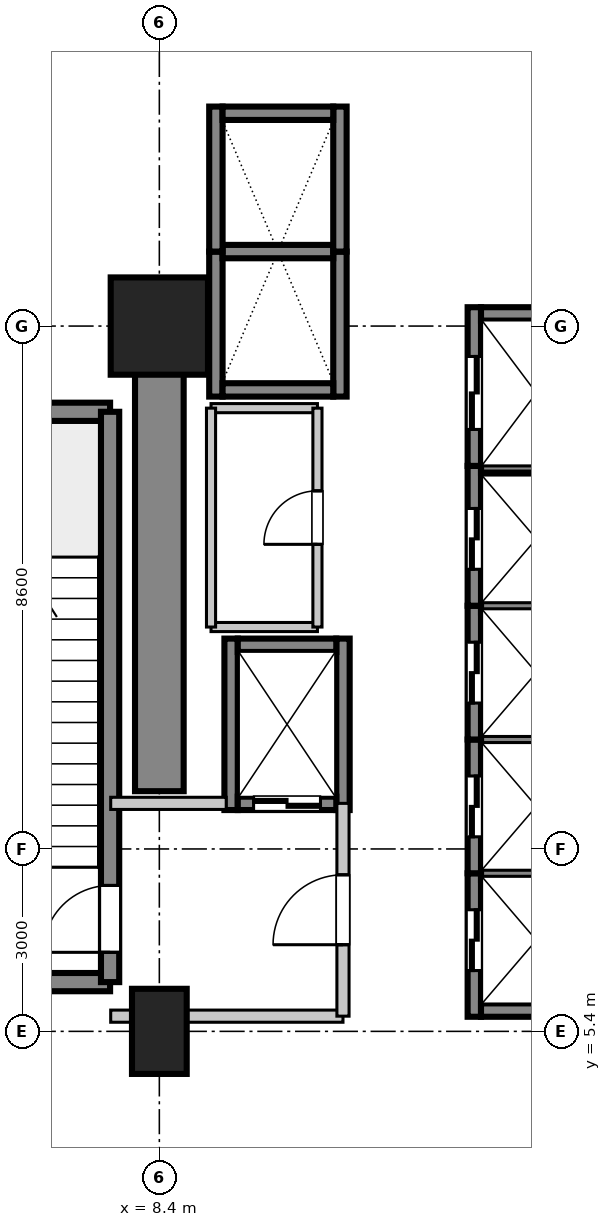
"""IFC4 building model, lengths in metres.
Left out: names, types, materials, properties, quantities, classifications, styles, units other than length and angle.
Written with IfcOpenShell. Run it as: python <this file> out.ifc"""

import sys

from ifc_helpers import new_model, si_unit, direction, frame, frame_2d, origin, origin_2d, place, context, subcontext, project, spatial, rectangle, extrude, source, transform, mapped, element, fill, save


model = new_model("IFC4")
c1 = context("Model", 3, precision=1e-05, world=origin(), true_north=direction((0.0, 1.0)))
c2 = subcontext(c1, "Body", "Model", "MODEL_VIEW")
j1 = project(units=[si_unit("LENGTHUNIT", "METRE"), si_unit("PLANEANGLEUNIT", "RADIAN")], contexts=[c1])
p1 = place(None, origin())
s1 = spatial("IfcSite", under=j1, at=p1, CompositionType="ELEMENT")
p2 = place(p1, origin())
s2 = spatial("IfcBuilding", under=s1, at=p2, CompositionType="ELEMENT")
p3 = place(p2, frame((0.0, 0.0, 21.6)))
s3 = spatial("IfcBuildingStorey", under=s2, at=p3, CompositionType="ELEMENT", Elevation=21.6)
m1 = source(origin(), c2, "Body", "SweptSolid", [
    extrude(rectangle(XDim=0.9, YDim=1.4, at=origin_2d()), origin(), (0.0, 0.0, 1.0), 5.355),
])
p4 = place(p3, frame((8.4, 5.4, 0.0), z_axis=(0.0, 0.0, 1.0), x_axis=(1.0, 0.0, 0.0)))
e1 = element("IfcColumn", 1, at=p4, inside=s3, PredefinedType="PILASTER", context=c2, shape_type="MappedRepresentation", body=[
    mapped(m1, transform((0.0, 0.0, 0.0), scale=1.0)),
])
m2 = source(origin(), c2, "Body", "SweptSolid", [
    extrude(rectangle(XDim=1.6, YDim=1.6, at=origin_2d()), origin(), (0.0, 0.0, 1.0), 5.355),
])
p5 = place(p3, frame((8.4, 17.0, 0.0), z_axis=(0.0, 0.0, 1.0), x_axis=(1.0, 0.0, 0.0)))
e2 = element("IfcColumn", 2, at=p5, inside=s3, PredefinedType="COLUMN", context=c2, shape_type="MappedRepresentation", body=[
    mapped(m2, transform((0.0, 0.0, 0.0), scale=1.0)),
])
m3 = source(origin(), c2, "Body", "SweptSolid", [
    extrude(rectangle(XDim=7.65, YDim=0.8, at=frame_2d((3.825, 0.0))), origin(), (0.0, 0.0, 1.0), 4.98),
])
p6 = place(p3, frame((8.4, 9.35, 0.0), z_axis=(0.0, 0.0, 1.0), x_axis=(0.0, 1.0, 0.0)))
e3 = element("IfcWall", 3, at=p6, inside=s3, PredefinedType="SHEAR", context=c2, shape_type="MappedRepresentation", body=[
    mapped(m3, transform((0.0, 0.0, 0.0), scale=1.0)),
])
m4 = source(origin(), c2, "Body", "SweptSolid", [
    extrude(rectangle(XDim=3.98, YDim=0.3, at=frame_2d((1.99, 0.0))), origin(), (0.0, 0.0, 1.0), 4.98),
])
for number, where, z_axis, x_axis in (
    (4, (3.61, 6.21, 0.0), (0.0, 0.0, 1.0), (1.0, 0.0, 0.0)),
    (5, (3.61, 15.59, 0.0), (0.0, 0.0, 1.0), (1.0, 0.0, 0.0)),
):
    element("IfcWall", number, at=place(p3, frame(where, z_axis=z_axis, x_axis=x_axis)), inside=s3, PredefinedType="SHEAR", context=c2, shape_type="MappedRepresentation", body=[
        mapped(m4, transform((0.0, 0.0, 0.0), scale=1.0)),
    ])
m5 = source(origin(), c2, "Body", "SweptSolid", [
    extrude(rectangle(XDim=9.38, YDim=0.3, at=frame_2d((4.69, 0.0))), origin(), (0.0, 0.0, 1.0), 4.98),
])
p7 = place(p3, frame((7.59, 6.21, 0.0), z_axis=(0.0, 0.0, 1.0), x_axis=(0.0, 1.0, 0.0)))
e6 = element("IfcWall", 6, at=p7, inside=s3, PredefinedType="SHEAR", context=c2, shape_type="MappedRepresentation", body=[
    mapped(m5, transform((0.0, 0.0, 0.0), scale=1.0)),
])
p8 = place(p7, frame((0.49, 0.0, 0.0)))
e7 = element("IfcOpeningElement", 7, at=p8, cuts=e6, PredefinedType="OPENING", context=c2, shape_type="SweptSolid", body=[
    extrude(rectangle(XDim=1.1, YDim=2.15, at=frame_2d((0.55, 1.075))), frame((0.0, 0.16, 0.0), z_axis=(0.0, -1.0, 0.0), x_axis=(1.0, 0.0, 0.0)), (0.0, 0.0, 1.0), 0.32),
])
m6 = source(origin(), c2, "Body", "SweptSolid", [
    extrude(rectangle(XDim=2.36, YDim=0.22, at=frame_2d((1.18, 0.0))), origin(), (0.0, 0.0, 1.0), 4.98),
])
p9 = place(p3, frame((13.58, 5.64, 0.0), z_axis=(0.0, 0.0, 1.0), x_axis=(0.0, 1.0, 0.0)))
e8 = element("IfcWall", 8, at=p9, inside=s3, PredefinedType="SHEAR", context=c2, shape_type="MappedRepresentation", body=[
    mapped(m6, transform((0.0, 0.0, 0.0), scale=1.0)),
])
p10 = place(p9, frame((0.76, 0.0, 0.0)))
e9 = element("IfcOpeningElement", 9, at=p10, cuts=e8, PredefinedType="OPENING", context=c2, shape_type="SweptSolid", body=[
    extrude(rectangle(XDim=1.0, YDim=2.2, at=frame_2d((0.5, 1.1))), frame((0.0, 0.12, 0.0), z_axis=(0.0, -1.0, 0.0), x_axis=(1.0, 0.0, 0.0)), (0.0, 0.0, 1.0), 0.24),
])
m7 = source(origin(), c2, "Body", "SweptSolid", [
    extrude(rectangle(XDim=1.82, YDim=0.22, at=frame_2d((0.91, 0.0))), origin(), (0.0, 0.0, 1.0), 4.98),
])
p11 = place(p3, frame((13.69, 5.75, 0.0), z_axis=(0.0, 0.0, 1.0), x_axis=(1.0, 0.0, 0.0)))
e10 = element("IfcWall", 10, at=p11, inside=s3, PredefinedType="SHEAR", context=c2, shape_type="MappedRepresentation", body=[
    mapped(m7, transform((0.0, 0.0, 0.0), scale=1.0)),
])
m8 = source(origin(), c2, "Body", "SweptSolid", [
    extrude(rectangle(XDim=1.82, YDim=0.22, at=frame_2d((0.91, 0.0))), origin(), (0.0, 0.0, 1.0), 5.4),
])
p12 = place(p3, frame((13.69, 8.0, 0.0), z_axis=(0.0, 0.0, 1.0), x_axis=(1.0, 0.0, 0.0)))
e11 = element("IfcWall", 11, at=p12, inside=s3, PredefinedType="SHEAR", context=c2, shape_type="MappedRepresentation", body=[
    mapped(m8, transform((0.0, 0.0, 0.0), scale=1.0)),
])
m9 = source(origin(), c2, "Body", "SweptSolid", [
    extrude(rectangle(XDim=2.2, YDim=0.22, at=frame_2d((1.1, 0.0))), origin(), (0.0, 0.0, 1.0), 4.98),
])
p13 = place(p3, frame((13.58, 8.0, 0.0), z_axis=(0.0, 0.0, 1.0), x_axis=(0.0, 1.0, 0.0)))
e12 = element("IfcWall", 12, at=p13, inside=s3, PredefinedType="SHEAR", context=c2, shape_type="MappedRepresentation", body=[
    mapped(m9, transform((0.0, 0.0, 0.0), scale=1.0)),
])
p14 = place(p13, frame((0.6, 0.0, 0.0)))
e13 = element("IfcOpeningElement", 13, at=p14, cuts=e12, PredefinedType="OPENING", context=c2, shape_type="SweptSolid", body=[
    extrude(rectangle(XDim=1.0, YDim=2.2, at=frame_2d((0.5, 1.1))), frame((0.0, 0.12, 0.0), z_axis=(0.0, -1.0, 0.0), x_axis=(1.0, 0.0, 0.0)), (0.0, 0.0, 1.0), 0.24),
])
p15 = place(p3, frame((13.69, 10.2, 0.0), z_axis=(0.0, 0.0, 1.0), x_axis=(1.0, 0.0, 0.0)))
e14 = element("IfcWall", 14, at=p15, inside=s3, PredefinedType="SHEAR", context=c2, shape_type="MappedRepresentation", body=[
    mapped(m8, transform((0.0, 0.0, 0.0), scale=1.0)),
])
p16 = place(p3, frame((13.58, 10.2, 0.0), z_axis=(0.0, 0.0, 1.0), x_axis=(0.0, 1.0, 0.0)))
e15 = element("IfcWall", 15, at=p16, inside=s3, PredefinedType="SHEAR", context=c2, shape_type="MappedRepresentation", body=[
    mapped(m9, transform((0.0, 0.0, 0.0), scale=1.0)),
])
p17 = place(p16, frame((0.6, 0.0, 0.0)))
e16 = element("IfcOpeningElement", 16, at=p17, cuts=e15, PredefinedType="OPENING", context=c2, shape_type="SweptSolid", body=[
    extrude(rectangle(XDim=1.0, YDim=2.2, at=frame_2d((0.5, 1.1))), frame((0.0, 0.12, 0.0), z_axis=(0.0, -1.0, 0.0), x_axis=(1.0, 0.0, 0.0)), (0.0, 0.0, 1.0), 0.24),
])
p18 = place(p3, frame((13.69, 12.4, 0.0), z_axis=(0.0, 0.0, 1.0), x_axis=(1.0, 0.0, 0.0)))
e17 = element("IfcWall", 17, at=p18, inside=s3, PredefinedType="SHEAR", context=c2, shape_type="MappedRepresentation", body=[
    mapped(m8, transform((0.0, 0.0, 0.0), scale=1.0)),
])
m10 = source(origin(), c2, "Body", "SweptSolid", [
    extrude(rectangle(XDim=2.3, YDim=0.22, at=frame_2d((1.15, 0.0))), origin(), (0.0, 0.0, 1.0), 4.98),
])
p19 = place(p3, frame((13.58, 12.4, 0.0), z_axis=(0.0, 0.0, 1.0), x_axis=(0.0, 1.0, 0.0)))
e18 = element("IfcWall", 18, at=p19, inside=s3, PredefinedType="SHEAR", context=c2, shape_type="MappedRepresentation", body=[
    mapped(m10, transform((0.0, 0.0, 0.0), scale=1.0)),
])
p20 = place(p19, frame((0.6, 0.0, 0.0)))
e19 = element("IfcOpeningElement", 19, at=p20, cuts=e18, PredefinedType="OPENING", context=c2, shape_type="SweptSolid", body=[
    extrude(rectangle(XDim=1.0, YDim=2.2, at=frame_2d((0.5, 1.1))), frame((0.0, 0.12, 0.0), z_axis=(0.0, -1.0, 0.0), x_axis=(1.0, 0.0, 0.0)), (0.0, 0.0, 1.0), 0.24),
])
p21 = place(p3, frame((13.69, 14.7, 0.0), z_axis=(0.0, 0.0, 1.0), x_axis=(1.0, 0.0, 0.0)))
e20 = element("IfcWall", 20, at=p21, inside=s3, PredefinedType="SHEAR", context=c2, shape_type="MappedRepresentation", body=[
    mapped(m8, transform((0.0, 0.0, 0.0), scale=1.0)),
])
m11 = source(origin(), c2, "Body", "SweptSolid", [
    extrude(rectangle(XDim=2.385, YDim=0.22, at=frame_2d((1.192, 0.0))), origin(), (0.0, 0.0, 1.0), 4.98),
])
for number, where, z_axis, x_axis in (
    (21, (9.33, 15.84, 0.0), (0.0, 0.0, 1.0), (0.0, 1.0, 0.0)),
    (22, (11.37, 15.84, 0.0), (0.0, 0.0, 1.0), (0.0, 1.0, 0.0)),
):
    element("IfcWall", number, at=place(p3, frame(where, z_axis=z_axis, x_axis=x_axis)), inside=s3, PredefinedType="SHEAR", context=c2, shape_type="MappedRepresentation", body=[
        mapped(m11, transform((0.0, 0.0, 0.0), scale=1.0)),
    ])
p22 = place(p3, frame((9.44, 15.95, 0.0), z_axis=(0.0, 0.0, 1.0), x_axis=(1.0, 0.0, 0.0)))
e23 = element("IfcWall", 23, at=p22, inside=s3, PredefinedType="SHEAR", context=c2, shape_type="MappedRepresentation", body=[
    mapped(m7, transform((0.0, 0.0, 0.0), scale=1.0)),
])
p23 = place(p3, frame((9.44, 18.225, 0.0), z_axis=(0.0, 0.0, 1.0), x_axis=(1.0, 0.0, 0.0)))
e24 = element("IfcWall", 24, at=p23, inside=s3, PredefinedType="SHEAR", context=c2, shape_type="MappedRepresentation", body=[
    mapped(m8, transform((0.0, 0.0, 0.0), scale=1.0)),
])
for number, where, z_axis, x_axis in (
    (25, (9.33, 18.225, 0.0), (0.0, 0.0, 1.0), (0.0, 1.0, 0.0)),
    (26, (11.37, 18.225, 0.0), (0.0, 0.0, 1.0), (0.0, 1.0, 0.0)),
):
    element("IfcWall", number, at=place(p3, frame(where, z_axis=z_axis, x_axis=x_axis)), inside=s3, PredefinedType="SHEAR", context=c2, shape_type="MappedRepresentation", body=[
        mapped(m11, transform((0.0, 0.0, 0.0), scale=1.0)),
    ])
p24 = place(p3, frame((9.44, 20.5, 0.0), z_axis=(0.0, 0.0, 1.0), x_axis=(1.0, 0.0, 0.0)))
e27 = element("IfcWall", 27, at=p24, inside=s3, PredefinedType="SHEAR", context=c2, shape_type="MappedRepresentation", body=[
    mapped(m7, transform((0.0, 0.0, 0.0), scale=1.0)),
])
m12 = source(origin(), c2, "Body", "SweptSolid", [
    extrude(rectangle(XDim=2.82, YDim=0.22, at=frame_2d((1.41, 0.0))), origin(), (0.0, 0.0, 1.0), 4.98),
])
for number, where, z_axis, x_axis in (
    (28, (9.58, 9.04, 0.0), (0.0, 0.0, 1.0), (0.0, 1.0, 0.0)),
    (29, (11.42, 9.04, 0.0), (0.0, 0.0, 1.0), (0.0, 1.0, 0.0)),
):
    element("IfcWall", number, at=place(p3, frame(where, z_axis=z_axis, x_axis=x_axis)), inside=s3, PredefinedType="SHEAR", context=c2, shape_type="MappedRepresentation", body=[
        mapped(m12, transform((0.0, 0.0, 0.0), scale=1.0)),
    ])
m13 = source(origin(), c2, "Body", "SweptSolid", [
    extrude(rectangle(XDim=1.62, YDim=0.22, at=frame_2d((0.81, 0.0))), origin(), (0.0, 0.0, 1.0), 4.98),
])
p25 = place(p3, frame((9.69, 9.15, 0.0), z_axis=(0.0, 0.0, 1.0), x_axis=(1.0, 0.0, 0.0)))
e30 = element("IfcWall", 30, at=p25, inside=s3, PredefinedType="SHEAR", context=c2, shape_type="MappedRepresentation", body=[
    mapped(m13, transform((0.0, 0.0, 0.0), scale=1.0)),
])
p26 = place(p25, frame((0.26, 0.0, 0.0)))
e31 = element("IfcOpeningElement", 31, at=p26, cuts=e30, PredefinedType="OPENING", context=c2, shape_type="SweptSolid", body=[
    extrude(rectangle(XDim=1.1, YDim=2.2, at=frame_2d((0.55, 1.1))), frame((0.0, 0.12, 0.0), z_axis=(0.0, -1.0, 0.0), x_axis=(1.0, 0.0, 0.0)), (0.0, 0.0, 1.0), 0.24),
])
p27 = place(p3, frame((9.69, 11.75, 0.0), z_axis=(0.0, 0.0, 1.0), x_axis=(1.0, 0.0, 0.0)))
e32 = element("IfcWall", 32, at=p27, inside=s3, PredefinedType="SHEAR", context=c2, shape_type="MappedRepresentation", body=[
    mapped(m13, transform((0.0, 0.0, 0.0), scale=1.0)),
])
m14 = source(origin(), c2, "Body", "SweptSolid", [
    extrude(rectangle(XDim=2.61, YDim=0.22, at=frame_2d((1.305, 0.0))), origin(), (0.0, 0.0, 1.0), 4.98),
])
p28 = place(p3, frame((13.58, 14.7, 0.0), z_axis=(0.0, 0.0, 1.0), x_axis=(0.0, 1.0, 0.0)))
e33 = element("IfcWall", 33, at=p28, inside=s3, PredefinedType="SHEAR", context=c2, shape_type="MappedRepresentation", body=[
    mapped(m14, transform((0.0, 0.0, 0.0), scale=1.0)),
])
p29 = place(p28, frame((0.6, 0.0, 0.0)))
e34 = element("IfcOpeningElement", 34, at=p29, cuts=e33, PredefinedType="OPENING", context=c2, shape_type="SweptSolid", body=[
    extrude(rectangle(XDim=1.2, YDim=2.2, at=frame_2d((0.6, 1.1))), frame((0.0, 0.12, 0.0), z_axis=(0.0, -1.0, 0.0), x_axis=(1.0, 0.0, 0.0)), (0.0, 0.0, 1.0), 0.24),
])
p30 = place(p3, frame((13.69, 17.2, 0.0), z_axis=(0.0, 0.0, 1.0), x_axis=(1.0, 0.0, 0.0)))
e35 = element("IfcWall", 35, at=p30, inside=s3, PredefinedType="SHEAR", context=c2, shape_type="MappedRepresentation", body=[
    mapped(m7, transform((0.0, 0.0, 0.0), scale=1.0)),
])
m15 = source(origin(), c2, "Body", "SweptSolid", [
    extrude(rectangle(XDim=3.82, YDim=0.2, at=frame_2d((1.91, 0.0))), origin(), (0.0, 0.0, 1.0), 3.1),
])
p31 = place(p3, frame((7.6, 5.65, 0.0), z_axis=(0.0, 0.0, 1.0), x_axis=(1.0, 0.0, 0.0)))
e36 = element("IfcWall", 36, at=p31, inside=s3, PredefinedType="PARTITIONING", context=c2, shape_type="MappedRepresentation", body=[
    mapped(m15, transform((0.0, 0.0, 0.0), scale=1.0)),
])
m16 = source(origin(), c2, "Body", "SweptSolid", [
    extrude(rectangle(XDim=1.9, YDim=0.2, at=frame_2d((0.95, 0.0))), origin(), (0.0, 0.0, 1.0), 3.1),
])
p32 = place(p3, frame((7.6, 9.15, 0.0), z_axis=(0.0, 0.0, 1.0), x_axis=(1.0, 0.0, 0.0)))
e37 = element("IfcWall", 37, at=p32, inside=s3, PredefinedType="PARTITIONING", context=c2, shape_type="MappedRepresentation", body=[
    mapped(m16, transform((0.0, 0.0, 0.0), scale=1.0)),
])
m17 = source(origin(), c2, "Body", "SweptSolid", [
    extrude(rectangle(XDim=3.5, YDim=0.2, at=frame_2d((1.75, 0.0))), origin(), (0.0, 0.0, 1.0), 3.1),
])
p33 = place(p3, frame((11.42, 5.65, 0.0), z_axis=(0.0, 0.0, 1.0), x_axis=(0.0, 1.0, 0.0)))
e38 = element("IfcWall", 38, at=p33, inside=s3, PredefinedType="PARTITIONING", context=c2, shape_type="MappedRepresentation", body=[
    mapped(m17, transform((0.0, 0.0, 0.0), scale=1.0)),
])
p34 = place(p33, frame((1.175, 0.0, 0.0)))
e39 = element("IfcOpeningElement", 39, at=p34, cuts=e38, PredefinedType="OPENING", context=c2, shape_type="SweptSolid", body=[
    extrude(rectangle(XDim=1.15, YDim=2.15, at=frame_2d((0.575, 1.075))), frame((0.0, 0.11, 0.0), z_axis=(0.0, -1.0, 0.0), x_axis=(1.0, 0.0, 0.0)), (0.0, 0.0, 1.0), 0.22),
])
m18 = source(origin(), c2, "Body", "SweptSolid", [
    extrude(rectangle(XDim=1.75, YDim=0.15, at=frame_2d((0.875, 0.0))), origin(), (0.0, 0.0, 1.0), 3.1),
])
for number, where, z_axis, x_axis in (
    (40, (9.25, 12.05, 0.0), (0.0, 0.0, 1.0), (1.0, 0.0, 0.0)),
    (41, (9.25, 15.65, 0.0), (0.0, 0.0, 1.0), (1.0, 0.0, 0.0)),
):
    element("IfcWall", number, at=place(p3, frame(where, z_axis=z_axis, x_axis=x_axis)), inside=s3, PredefinedType="PARTITIONING", context=c2, shape_type="MappedRepresentation", body=[
        mapped(m18, transform((0.0, 0.0, 0.0), scale=1.0)),
    ])
m19 = source(origin(), c2, "Body", "SweptSolid", [
    extrude(rectangle(XDim=3.6, YDim=0.15, at=frame_2d((1.8, 0.0))), origin(), (0.0, 0.0, 1.0), 3.1),
])
p35 = place(p3, frame((9.25, 12.05, 0.0), z_axis=(0.0, 0.0, 1.0), x_axis=(0.0, 1.0, 0.0)))
e42 = element("IfcWall", 42, at=p35, inside=s3, PredefinedType="PARTITIONING", context=c2, shape_type="MappedRepresentation", body=[
    mapped(m19, transform((0.0, 0.0, 0.0), scale=1.0)),
])
p36 = place(p3, frame((11.0, 12.05, 0.0), z_axis=(0.0, 0.0, 1.0), x_axis=(0.0, 1.0, 0.0)))
e43 = element("IfcWall", 43, at=p36, inside=s3, PredefinedType="PARTITIONING", context=c2, shape_type="MappedRepresentation", body=[
    mapped(m19, transform((0.0, 0.0, 0.0), scale=1.0)),
])
p37 = place(p36, frame((1.36, 0.0, 0.0)))
e44 = element("IfcOpeningElement", 44, at=p37, cuts=e43, PredefinedType="OPENING", context=c2, shape_type="SweptSolid", body=[
    extrude(rectangle(XDim=0.88, YDim=2.1, at=frame_2d((0.44, 1.05))), frame((0.0, 0.085, 0.0), z_axis=(0.0, -1.0, 0.0), x_axis=(1.0, 0.0, 0.0)), (0.0, 0.0, 1.0), 0.17),
])
m20 = source(origin(), c2, "Body", "SweptSolid", [
    extrude(rectangle(XDim=1.1, YDim=2.15, at=frame_2d((0.55, 1.075))), frame((0.0, 0.025, 0.0), z_axis=(0.0, -1.0, 0.0), x_axis=(1.0, 0.0, 0.0)), (0.0, 0.0, 1.0), 0.05),
])
p38 = place(p8, origin())
e45 = element("IfcDoor", 45, at=p38, inside=s3, OperationType="SINGLE_SWING_LEFT", PredefinedType="DOOR", context=c2, shape_type="MappedRepresentation", body=[
    mapped(m20, transform((0.0, 0.0, 0.0), scale=1.0)),
])
fill(e7, e45)
m21 = source(origin(), c2, "Body", "SweptSolid", [
    extrude(rectangle(XDim=1.0, YDim=2.2, at=frame_2d((0.5, 1.1))), frame((0.0, 0.025, 0.0), z_axis=(0.0, -1.0, 0.0), x_axis=(1.0, 0.0, 0.0)), (0.0, 0.0, 1.0), 0.05),
])
p39 = place(p10, origin())
e46 = element("IfcDoor", 46, at=p39, inside=s3, OperationType="DOUBLE_DOOR_SLIDING", PredefinedType="DOOR", context=c2, shape_type="MappedRepresentation", body=[
    mapped(m21, transform((0.0, 0.0, 0.0), scale=1.0)),
])
fill(e9, e46)
p40 = place(p14, origin())
e47 = element("IfcDoor", 47, at=p40, inside=s3, OperationType="DOUBLE_DOOR_SLIDING", PredefinedType="DOOR", context=c2, shape_type="MappedRepresentation", body=[
    mapped(m21, transform((0.0, 0.0, 0.0), scale=1.0)),
])
fill(e13, e47)
p41 = place(p17, origin())
e48 = element("IfcDoor", 48, at=p41, inside=s3, OperationType="DOUBLE_DOOR_SLIDING", PredefinedType="DOOR", context=c2, shape_type="MappedRepresentation", body=[
    mapped(m21, transform((0.0, 0.0, 0.0), scale=1.0)),
])
fill(e16, e48)
p42 = place(p20, origin())
e49 = element("IfcDoor", 49, at=p42, inside=s3, OperationType="DOUBLE_DOOR_SLIDING", PredefinedType="DOOR", context=c2, shape_type="MappedRepresentation", body=[
    mapped(m21, transform((0.0, 0.0, 0.0), scale=1.0)),
])
fill(e19, e49)
m22 = source(origin(), c2, "Body", "SweptSolid", [
    extrude(rectangle(XDim=1.1, YDim=2.2, at=frame_2d((0.55, 1.1))), frame((0.0, 0.025, 0.0), z_axis=(0.0, -1.0, 0.0), x_axis=(1.0, 0.0, 0.0)), (0.0, 0.0, 1.0), 0.05),
])
p43 = place(p26, frame((1.1, 0.0, 0.0), z_axis=(0.0, 0.0, 1.0), x_axis=(-1.0, 0.0, 0.0)))
e50 = element("IfcDoor", 50, at=p43, inside=s3, OperationType="DOUBLE_DOOR_SLIDING", PredefinedType="DOOR", context=c2, shape_type="MappedRepresentation", body=[
    mapped(m22, transform((0.0, 0.0, 0.0), scale=1.0)),
])
fill(e31, e50)
m23 = source(origin(), c2, "Body", "SweptSolid", [
    extrude(rectangle(XDim=1.2, YDim=2.2, at=frame_2d((0.6, 1.1))), frame((0.0, 0.025, 0.0), z_axis=(0.0, -1.0, 0.0), x_axis=(1.0, 0.0, 0.0)), (0.0, 0.0, 1.0), 0.05),
])
p44 = place(p29, origin())
e51 = element("IfcDoor", 51, at=p44, inside=s3, OperationType="DOUBLE_DOOR_SLIDING", PredefinedType="DOOR", context=c2, shape_type="MappedRepresentation", body=[
    mapped(m23, transform((0.0, 0.0, 0.0), scale=1.0)),
])
fill(e34, e51)
m24 = source(origin(), c2, "Body", "SweptSolid", [
    extrude(rectangle(XDim=1.15, YDim=2.15, at=frame_2d((0.575, 1.075))), frame((0.0, 0.025, 0.0), z_axis=(0.0, -1.0, 0.0), x_axis=(1.0, 0.0, 0.0)), (0.0, 0.0, 1.0), 0.05),
])
p45 = place(p34, frame((1.15, 0.0, 0.0), z_axis=(0.0, 0.0, 1.0), x_axis=(-1.0, 0.0, 0.0)))
e52 = element("IfcDoor", 52, at=p45, inside=s3, OperationType="SINGLE_SWING_LEFT", PredefinedType="DOOR", context=c2, shape_type="MappedRepresentation", body=[
    mapped(m24, transform((0.0, 0.0, 0.0), scale=1.0)),
])
fill(e39, e52)
m25 = source(origin(), c2, "Body", "SweptSolid", [
    extrude(rectangle(XDim=0.88, YDim=2.1, at=frame_2d((0.44, 1.05))), frame((0.0, 0.025, 0.0), z_axis=(0.0, -1.0, 0.0), x_axis=(1.0, 0.0, 0.0)), (0.0, 0.0, 1.0), 0.05),
])
p46 = place(p37, origin())
e53 = element("IfcDoor", 53, at=p46, inside=s3, OperationType="SINGLE_SWING_LEFT", PredefinedType="DOOR", context=c2, shape_type="MappedRepresentation", body=[
    mapped(m25, transform((0.0, 0.0, 0.0), scale=1.0)),
])
fill(e44, e53)
save(model, sys.argv[1])
